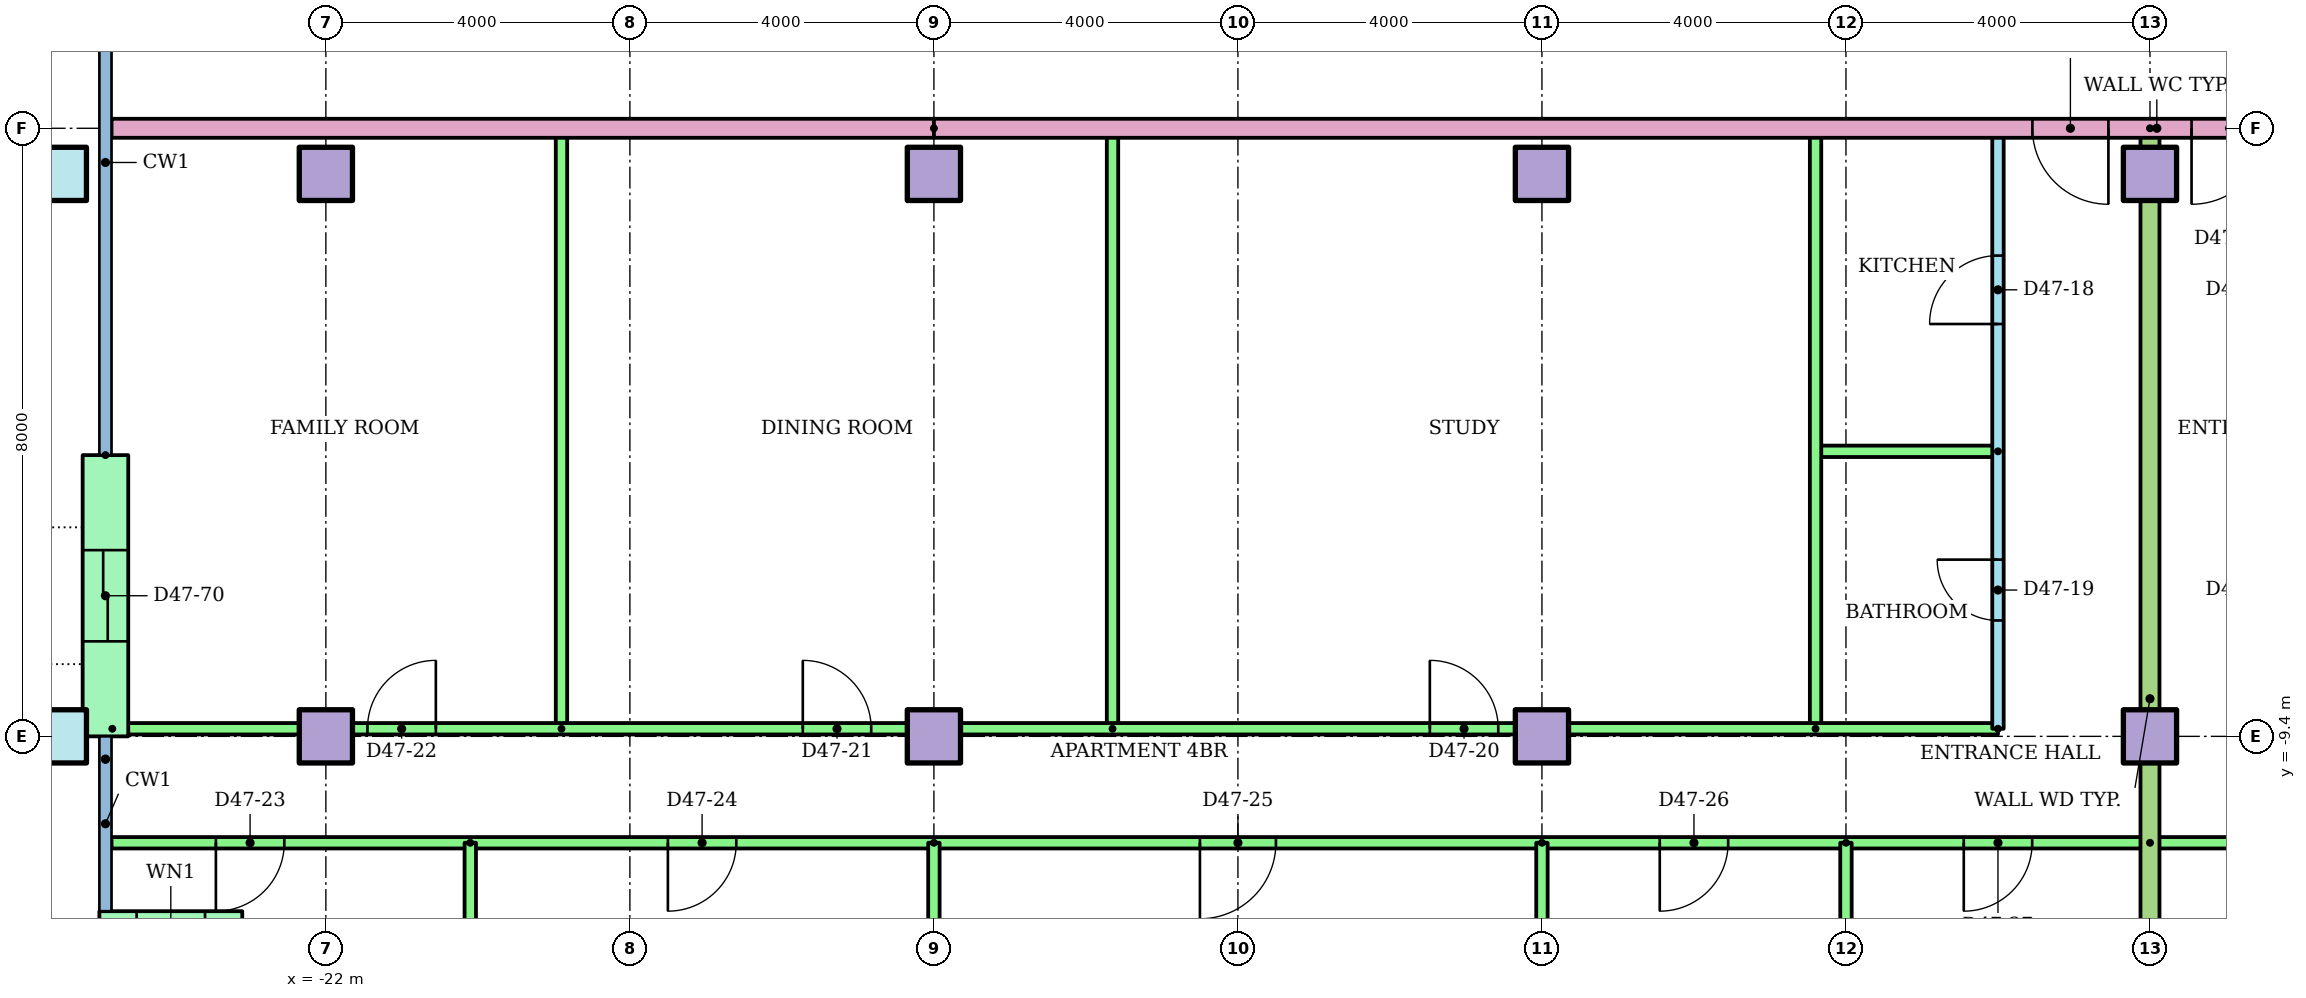
"""IFC4 building model, lengths in metres.
Left out: names, types, materials, properties, quantities, classifications, styles, units other than length and angle.
Written with IfcOpenShell. Run it as: python <this file> out.ifc"""

import sys

from ifc_helpers import new_model, si_unit, direction, frame, frame_2d, origin, origin_2d, place, context, subcontext, project, spatial, rectangle, hollow_rectangle, extrude, element, fill, save


model = new_model("IFC4")
c1 = context("Model", 3, precision=1e-05, world=origin(), true_north=direction((0.0, 1.0)))
c2 = subcontext(c1, "Body", "Model", "MODEL_VIEW")
j1 = project(units=[si_unit("LENGTHUNIT", "METRE"), si_unit("PLANEANGLEUNIT", "RADIAN")], contexts=[c1])
p1 = place(None, origin())
s1 = spatial("IfcSite", under=j1, at=p1, CompositionType="ELEMENT")
p2 = place(p1, origin())
s2 = spatial("IfcBuilding", under=s1, at=p2, CompositionType="ELEMENT")
p3 = place(p2, frame((0.0, 0.0, 181.3)))
s3 = spatial("IfcBuildingStorey", under=s2, at=p3, CompositionType="ELEMENT", Elevation=181.3)
p4 = place(p3, frame((-25.5, -9.4, 0.0)))
e1 = element("IfcColumn", 1, at=p4, inside=s3, PredefinedType="COLUMN", context=c2, shape_type="SweptSolid", body=[
    extrude(hollow_rectangle(XDim=0.7, YDim=0.7, WallThickness=0.036, at=origin_2d()), origin(), (0.0, 0.0, 1.0), 3.2),
])
for number, where in (
    (2, (-22.0, -9.4, 0.0)),
    (3, (-14.0, -9.4, 0.0)),
    (4, (-6.0, -9.4, 0.0)),
    (5, (2.0, -9.4, 0.0)),
):
    element("IfcColumn", number, at=place(p3, frame(where)), inside=s3, PredefinedType="COLUMN", context=c2, shape_type="SweptSolid", body=[
        extrude(rectangle(XDim=0.7, YDim=0.7, at=origin_2d()), origin(), (0.0, 0.0, 1.0), 3.2),
    ])
p5 = place(p3, frame((-25.5, -2.0, 0.0)))
e6 = element("IfcColumn", 6, at=p5, inside=s3, PredefinedType="COLUMN", context=c2, shape_type="SweptSolid", body=[
    extrude(hollow_rectangle(XDim=0.7, YDim=0.7, WallThickness=0.036, at=origin_2d()), origin(), (0.0, 0.0, 1.0), 3.2),
])
for number, where in (
    (7, (-22.0, -2.0, 0.0)),
    (8, (-14.0, -2.0, 0.0)),
    (9, (-6.0, -2.0, 0.0)),
    (10, (2.0, -2.0, 0.0)),
):
    element("IfcColumn", number, at=place(p3, frame(where)), inside=s3, PredefinedType="COLUMN", context=c2, shape_type="SweptSolid", body=[
        extrude(rectangle(XDim=0.7, YDim=0.7, at=origin_2d()), origin(), (0.0, 0.0, 1.0), 3.2),
    ])
p6 = place(p3, frame((-24.9, -5.7, 0.0), z_axis=(0.0, 0.0, 1.0), x_axis=(0.0, -1.0, 0.0)))
e11 = element("IfcWall", 11, at=p6, inside=s3, PredefinedType="STANDARD", context=c2, shape_type="SweptSolid", body=[
    extrude(rectangle(XDim=3.7, YDim=0.6, at=frame_2d((1.85, 0.0))), origin(), (0.0, 0.0, 1.0), 2.92),
])
p7 = place(p6, frame((1.25, 0.0, 0.0)))
e12 = element("IfcOpeningElement", 12, at=p7, cuts=e11, PredefinedType="OPENING", context=c2, shape_type="SweptSolid", body=[
    extrude(rectangle(XDim=1.2, YDim=2.1, at=frame_2d((0.6, 1.05))), frame((0.0, 0.31, 0.0), z_axis=(0.0, -1.0, 0.0), x_axis=(1.0, 0.0, 0.0)), (0.0, 0.0, 1.0), 0.62),
])
p8 = place(p3, frame((-24.98, -12.0, 0.0)))
e13 = element("IfcWall", 13, at=p8, inside=s3, PredefinedType="STANDARD", context=c2, shape_type="SweptSolid", body=[
    extrude(rectangle(XDim=1.88, YDim=0.6, at=frame_2d((0.94, 0.0))), origin(), (0.0, 0.0, 1.0), 2.92),
])
p9 = place(p8, frame((0.49, 0.0, 0.9)))
e14 = element("IfcOpeningElement", 14, at=p9, cuts=e13, PredefinedType="OPENING", context=c2, shape_type="SweptSolid", body=[
    extrude(rectangle(XDim=0.9, YDim=1.5, at=frame_2d((0.45, 0.75))), frame((0.0, 0.31, 0.0), z_axis=(0.0, -1.0, 0.0), x_axis=(1.0, 0.0, 0.0)), (0.0, 0.0, 1.0), 0.62),
])
p10 = place(p3, frame((0.0, -9.3, 0.0), z_axis=(0.0, 0.0, 1.0), x_axis=(0.0, 1.0, 0.0)))
e15 = element("IfcWall", 15, at=p10, inside=s3, PredefinedType="PARTITIONING", context=c2, shape_type="SweptSolid", body=[
    extrude(rectangle(XDim=7.9, YDim=0.15, at=frame_2d((3.95, 0.0))), origin(), (0.0, 0.0, 1.0), 2.4),
])
p11 = place(p10, frame((5.325, 0.0, 0.0)))
e16 = element("IfcOpeningElement", 16, at=p11, cuts=e15, PredefinedType="OPENING", context=c2, shape_type="SweptSolid", body=[
    extrude(rectangle(XDim=0.9, YDim=2.1, at=frame_2d((0.45, 1.05))), frame((0.0, 0.085, 0.0), z_axis=(0.0, -1.0, 0.0), x_axis=(1.0, 0.0, 0.0)), (0.0, 0.0, 1.0), 0.17),
])
p12 = place(p10, frame((1.425, 0.0, 0.0)))
e17 = element("IfcOpeningElement", 17, at=p12, cuts=e15, PredefinedType="OPENING", context=c2, shape_type="SweptSolid", body=[
    extrude(rectangle(XDim=0.8, YDim=2.1, at=frame_2d((0.4, 1.05))), frame((0.0, 0.085, 0.0), z_axis=(0.0, -1.0, 0.0), x_axis=(1.0, 0.0, 0.0)), (0.0, 0.0, 1.0), 0.17),
])
p13 = place(p3, frame((0.0, -5.65, 0.0), z_axis=(0.0, 0.0, 1.0), x_axis=(-1.0, 0.0, 0.0)))
e18 = element("IfcWall", 18, at=p13, inside=s3, PredefinedType="PARTITIONING", context=c2, shape_type="SweptSolid", body=[
    extrude(rectangle(XDim=2.4, YDim=0.15, at=frame_2d((1.2, 0.0))), origin(), (0.0, 0.0, 1.0), 2.4),
])
for number, where, z_axis, x_axis in (
    (19, (-2.4, -9.3, 0.0), (0.0, 0.0, 1.0), (0.0, 1.0, 0.0)),
    (20, (-11.65, -9.3, 0.0), (0.0, 0.0, 1.0), (0.0, 1.0, 0.0)),
    (21, (-18.9, -9.3, 0.0), (0.0, 0.0, 1.0), (0.0, 1.0, 0.0)),
):
    element("IfcWall", number, at=place(p3, frame(where, z_axis=z_axis, x_axis=x_axis)), inside=s3, PredefinedType="PARTITIONING", context=c2, shape_type="SweptSolid", body=[
        extrude(rectangle(XDim=7.9, YDim=0.15, at=frame_2d((3.95, 0.0))), origin(), (0.0, 0.0, 1.0), 2.4),
    ])
p14 = place(p3, frame((-24.81, -9.3, 0.0)))
e22 = element("IfcWall", 22, at=p14, inside=s3, PredefinedType="PARTITIONING", context=c2, shape_type="SweptSolid", body=[
    extrude(rectangle(XDim=24.81, YDim=0.15, at=frame_2d((12.405, 0.0))), origin(), (0.0, 0.0, 1.0), 2.4),
])
p15 = place(p14, frame((17.335, 0.0, 0.0)))
e23 = element("IfcOpeningElement", 23, at=p15, cuts=e22, PredefinedType="OPENING", context=c2, shape_type="SweptSolid", body=[
    extrude(rectangle(XDim=0.9, YDim=2.1, at=frame_2d((0.45, 1.05))), frame((0.0, 0.085, 0.0), z_axis=(0.0, -1.0, 0.0), x_axis=(1.0, 0.0, 0.0)), (0.0, 0.0, 1.0), 0.17),
])
p16 = place(p14, frame((9.085, 0.0, 0.0)))
e24 = element("IfcOpeningElement", 24, at=p16, cuts=e22, PredefinedType="OPENING", context=c2, shape_type="SweptSolid", body=[
    extrude(rectangle(XDim=0.9, YDim=2.1, at=frame_2d((0.45, 1.05))), frame((0.0, 0.085, 0.0), z_axis=(0.0, -1.0, 0.0), x_axis=(1.0, 0.0, 0.0)), (0.0, 0.0, 1.0), 0.17),
])
p17 = place(p14, frame((3.357, 0.0, 0.0)))
e25 = element("IfcOpeningElement", 25, at=p17, cuts=e22, PredefinedType="OPENING", context=c2, shape_type="SweptSolid", body=[
    extrude(rectangle(XDim=0.9, YDim=2.1, at=frame_2d((0.45, 1.05))), frame((0.0, 0.085, 0.0), z_axis=(0.0, -1.0, 0.0), x_axis=(1.0, 0.0, 0.0)), (0.0, 0.0, 1.0), 0.17),
])
p18 = place(p3, frame((2.0, -10.8, 0.0), z_axis=(0.0, 0.0, 1.0), x_axis=(-1.0, 0.0, 0.0)))
e26 = element("IfcWall", 26, at=p18, inside=s3, PredefinedType="PARTITIONING", context=c2, shape_type="SweptSolid", body=[
    extrude(rectangle(XDim=26.82, YDim=0.15, at=frame_2d((13.41, 0.0))), origin(), (0.0, 0.0, 1.0), 2.4),
])
p19 = place(p18, frame((24.547, 0.0, 0.0)))
e27 = element("IfcOpeningElement", 27, at=p19, cuts=e26, PredefinedType="OPENING", context=c2, shape_type="SweptSolid", body=[
    extrude(rectangle(XDim=0.9, YDim=2.1, at=frame_2d((0.45, 1.05))), frame((0.0, 0.085, 0.0), z_axis=(0.0, -1.0, 0.0), x_axis=(1.0, 0.0, 0.0)), (0.0, 0.0, 1.0), 0.17),
])
p20 = place(p18, frame((18.6, 0.0, 0.0)))
e28 = element("IfcOpeningElement", 28, at=p20, cuts=e26, PredefinedType="OPENING", context=c2, shape_type="SweptSolid", body=[
    extrude(rectangle(XDim=0.9, YDim=2.1, at=frame_2d((0.45, 1.05))), frame((0.0, 0.085, 0.0), z_axis=(0.0, -1.0, 0.0), x_axis=(1.0, 0.0, 0.0)), (0.0, 0.0, 1.0), 0.17),
])
p21 = place(p18, frame((11.5, 0.0, 0.0)))
e29 = element("IfcOpeningElement", 29, at=p21, cuts=e26, PredefinedType="OPENING", context=c2, shape_type="SweptSolid", body=[
    extrude(rectangle(XDim=1.0, YDim=2.1, at=frame_2d((0.5, 1.05))), frame((0.0, 0.085, 0.0), z_axis=(0.0, -1.0, 0.0), x_axis=(1.0, 0.0, 0.0)), (0.0, 0.0, 1.0), 0.17),
])
p22 = place(p18, frame((5.55, 0.0, 0.0)))
e30 = element("IfcOpeningElement", 30, at=p22, cuts=e26, PredefinedType="OPENING", context=c2, shape_type="SweptSolid", body=[
    extrude(rectangle(XDim=0.9, YDim=2.1, at=frame_2d((0.45, 1.05))), frame((0.0, 0.085, 0.0), z_axis=(0.0, -1.0, 0.0), x_axis=(1.0, 0.0, 0.0)), (0.0, 0.0, 1.0), 0.17),
])
p23 = place(p18, frame((1.55, 0.0, 0.0)))
e31 = element("IfcOpeningElement", 31, at=p23, cuts=e26, PredefinedType="OPENING", context=c2, shape_type="SweptSolid", body=[
    extrude(rectangle(XDim=0.9, YDim=2.1, at=frame_2d((0.45, 1.05))), frame((0.0, 0.085, 0.0), z_axis=(0.0, -1.0, 0.0), x_axis=(1.0, 0.0, 0.0)), (0.0, 0.0, 1.0), 0.17),
])
p24 = place(p3, frame((-20.1, -10.8, 0.0), z_axis=(0.0, 0.0, 1.0), x_axis=(0.0, -1.0, 0.0)))
e32 = element("IfcWall", 32, at=p24, inside=s3, PredefinedType="PARTITIONING", context=c2, shape_type="SweptSolid", body=[
    extrude(rectangle(XDim=3.82, YDim=0.15, at=frame_2d((1.91, 0.0))), origin(), (0.0, 0.0, 1.0), 2.4),
])
for number, where, z_axis, x_axis in (
    (33, (-14.0, -10.8, 0.0), (0.0, 0.0, 1.0), (0.0, -1.0, 0.0)),
    (34, (-6.0, -10.8, 0.0), (0.0, 0.0, 1.0), (0.0, -1.0, 0.0)),
):
    element("IfcWall", number, at=place(p3, frame(where, z_axis=z_axis, x_axis=x_axis)), inside=s3, PredefinedType="PARTITIONING", context=c2, shape_type="SweptSolid", body=[
        extrude(rectangle(XDim=5.61, YDim=0.15, at=frame_2d((2.805, 0.0))), origin(), (0.0, 0.0, 1.0), 2.4),
    ])
p25 = place(p3, frame((-2.0, -10.8, 0.0), z_axis=(0.0, 0.0, 1.0), x_axis=(0.0, -1.0, 0.0)))
e35 = element("IfcWall", 35, at=p25, inside=s3, PredefinedType="PARTITIONING", context=c2, shape_type="SweptSolid", body=[
    extrude(rectangle(XDim=5.621, YDim=0.15, at=frame_2d((2.811, 0.0))), origin(), (0.0, 0.0, 1.0), 2.4),
])
p26 = place(p3, frame((18.0, -10.8, 0.0), z_axis=(0.0, 0.0, 1.0), x_axis=(-1.0, 0.0, 0.0)))
e36 = element("IfcWall", 36, at=p26, inside=s3, PredefinedType="PARTITIONING", context=c2, shape_type="SweptSolid", body=[
    extrude(rectangle(XDim=16.0, YDim=0.15, at=frame_2d((8.0, 0.0))), origin(), (0.0, 0.0, 1.0), 2.4),
])
p27 = place(p26, frame((13.55, 0.0, 0.0)))
e37 = element("IfcOpeningElement", 37, at=p27, cuts=e36, PredefinedType="OPENING", context=c2, shape_type="SweptSolid", body=[
    extrude(rectangle(XDim=0.9, YDim=2.1, at=frame_2d((0.45, 1.05))), frame((0.0, 0.085, 0.0), z_axis=(0.0, -1.0, 0.0), x_axis=(1.0, 0.0, 0.0)), (0.0, 0.0, 1.0), 0.17),
])
p28 = place(p26, frame((9.5, 0.0, 0.0)))
e38 = element("IfcOpeningElement", 38, at=p28, cuts=e36, PredefinedType="OPENING", context=c2, shape_type="SweptSolid", body=[
    extrude(rectangle(XDim=1.0, YDim=2.1, at=frame_2d((0.5, 1.05))), frame((0.0, 0.085, 0.0), z_axis=(0.0, -1.0, 0.0), x_axis=(1.0, 0.0, 0.0)), (0.0, 0.0, 1.0), 0.17),
])
p29 = place(p26, frame((5.55, 0.0, 0.0)))
e39 = element("IfcOpeningElement", 39, at=p29, cuts=e36, PredefinedType="OPENING", context=c2, shape_type="SweptSolid", body=[
    extrude(rectangle(XDim=0.9, YDim=2.1, at=frame_2d((0.45, 1.05))), frame((0.0, 0.085, 0.0), z_axis=(0.0, -1.0, 0.0), x_axis=(1.0, 0.0, 0.0)), (0.0, 0.0, 1.0), 0.17),
])
p30 = place(p26, frame((1.55, 0.0, 0.0)))
e40 = element("IfcOpeningElement", 40, at=p30, cuts=e36, PredefinedType="OPENING", context=c2, shape_type="SweptSolid", body=[
    extrude(rectangle(XDim=0.9, YDim=2.1, at=frame_2d((0.45, 1.05))), frame((0.0, 0.085, 0.0), z_axis=(0.0, -1.0, 0.0), x_axis=(1.0, 0.0, 0.0)), (0.0, 0.0, 1.0), 0.17),
])
p31 = place(p3, frame((2.0, -1.4, 0.0), z_axis=(0.0, 0.0, 1.0), x_axis=(0.0, -1.0, 0.0)))
e41 = element("IfcWall", 41, at=p31, inside=s3, PredefinedType="PARTITIONING", context=c2, shape_type="SweptSolid", body=[
    extrude(rectangle(XDim=15.01, YDim=0.25, at=frame_2d((7.505, 0.0))), origin(), (0.0, 0.0, 1.0), 2.4),
])
p32 = place(p3, frame((-14.0, -1.4, 0.0), z_axis=(0.0, 0.0, 1.0), x_axis=(-1.0, 0.0, 0.0)))
e42 = element("IfcWall", 42, at=p32, inside=s3, PredefinedType="PARTITIONING", context=c2, shape_type="SweptSolid", body=[
    extrude(rectangle(XDim=10.82, YDim=0.25, at=frame_2d((5.41, 0.0))), origin(), (0.0, 0.0, 1.0), 2.4),
])
p33 = place(p3, frame((14.0, -1.4, 0.0), z_axis=(0.0, 0.0, 1.0), x_axis=(-1.0, 0.0, 0.0)))
e43 = element("IfcWall", 43, at=p33, inside=s3, PredefinedType="PARTITIONING", context=c2, shape_type="SweptSolid", body=[
    extrude(rectangle(XDim=28.0, YDim=0.25, at=frame_2d((14.0, 0.0))), origin(), (0.0, 0.0, 1.0), 2.4),
])
p34 = place(p33, frame((12.547, 0.0, 0.0)))
e44 = element("IfcOpeningElement", 44, at=p34, cuts=e43, PredefinedType="OPENING", context=c2, shape_type="SweptSolid", body=[
    extrude(rectangle(XDim=1.0, YDim=2.1, at=frame_2d((0.5, 1.05))), frame((0.0, 0.135, 0.0), z_axis=(0.0, -1.0, 0.0), x_axis=(1.0, 0.0, 0.0)), (0.0, 0.0, 1.0), 0.27),
])
p35 = place(p33, frame((10.453, 0.0, 0.0)))
e45 = element("IfcOpeningElement", 45, at=p35, cuts=e43, PredefinedType="OPENING", context=c2, shape_type="SweptSolid", body=[
    extrude(rectangle(XDim=1.0, YDim=2.1, at=frame_2d((0.5, 1.05))), frame((0.0, 0.135, 0.0), z_axis=(0.0, -1.0, 0.0), x_axis=(1.0, 0.0, 0.0)), (0.0, 0.0, 1.0), 0.27),
])
p36 = place(p11, origin())
e46 = element("IfcDoor", 46, at=p36, inside=s3, OperationType="SINGLE_SWING_LEFT", PredefinedType="DOOR", context=c2, shape_type="SweptSolid", body=[
    extrude(rectangle(XDim=0.9, YDim=2.1, at=frame_2d((0.45, 1.05))), frame((0.0, 0.025, 0.0), z_axis=(0.0, -1.0, 0.0), x_axis=(1.0, 0.0, 0.0)), (0.0, 0.0, 1.0), 0.05),
])
fill(e16, e46)
p37 = place(p12, origin())
e47 = element("IfcDoor", 47, at=p37, inside=s3, OperationType="SINGLE_SWING_RIGHT", PredefinedType="DOOR", context=c2, shape_type="SweptSolid", body=[
    extrude(rectangle(XDim=0.8, YDim=2.1, at=frame_2d((0.4, 1.05))), frame((0.0, 0.025, 0.0), z_axis=(0.0, -1.0, 0.0), x_axis=(1.0, 0.0, 0.0)), (0.0, 0.0, 1.0), 0.05),
])
fill(e17, e47)
p38 = place(p15, origin())
e48 = element("IfcDoor", 48, at=p38, inside=s3, OperationType="SINGLE_SWING_LEFT", PredefinedType="DOOR", context=c2, shape_type="SweptSolid", body=[
    extrude(rectangle(XDim=0.9, YDim=2.1, at=frame_2d((0.45, 1.05))), frame((0.0, 0.025, 0.0), z_axis=(0.0, -1.0, 0.0), x_axis=(1.0, 0.0, 0.0)), (0.0, 0.0, 1.0), 0.05),
])
fill(e23, e48)
p39 = place(p16, origin())
e49 = element("IfcDoor", 49, at=p39, inside=s3, OperationType="SINGLE_SWING_LEFT", PredefinedType="DOOR", context=c2, shape_type="SweptSolid", body=[
    extrude(rectangle(XDim=0.9, YDim=2.1, at=frame_2d((0.45, 1.05))), frame((0.0, 0.025, 0.0), z_axis=(0.0, -1.0, 0.0), x_axis=(1.0, 0.0, 0.0)), (0.0, 0.0, 1.0), 0.05),
])
fill(e24, e49)
p40 = place(p17, origin())
e50 = element("IfcDoor", 50, at=p40, inside=s3, OperationType="SINGLE_SWING_RIGHT", PredefinedType="DOOR", context=c2, shape_type="SweptSolid", body=[
    extrude(rectangle(XDim=0.9, YDim=2.1, at=frame_2d((0.45, 1.05))), frame((0.0, 0.025, 0.0), z_axis=(0.0, -1.0, 0.0), x_axis=(1.0, 0.0, 0.0)), (0.0, 0.0, 1.0), 0.05),
])
fill(e25, e50)
p41 = place(p19, origin())
e51 = element("IfcDoor", 51, at=p41, inside=s3, OperationType="SINGLE_SWING_RIGHT", PredefinedType="DOOR", context=c2, shape_type="SweptSolid", body=[
    extrude(rectangle(XDim=0.9, YDim=2.1, at=frame_2d((0.45, 1.05))), frame((0.0, 0.025, 0.0), z_axis=(0.0, -1.0, 0.0), x_axis=(1.0, 0.0, 0.0)), (0.0, 0.0, 1.0), 0.05),
])
fill(e27, e51)
p42 = place(p20, origin())
e52 = element("IfcDoor", 52, at=p42, inside=s3, OperationType="SINGLE_SWING_RIGHT", PredefinedType="DOOR", context=c2, shape_type="SweptSolid", body=[
    extrude(rectangle(XDim=0.9, YDim=2.1, at=frame_2d((0.45, 1.05))), frame((0.0, 0.025, 0.0), z_axis=(0.0, -1.0, 0.0), x_axis=(1.0, 0.0, 0.0)), (0.0, 0.0, 1.0), 0.05),
])
fill(e28, e52)
p43 = place(p21, origin())
e53 = element("IfcDoor", 53, at=p43, inside=s3, OperationType="SINGLE_SWING_RIGHT", PredefinedType="DOOR", context=c2, shape_type="SweptSolid", body=[
    extrude(rectangle(XDim=1.0, YDim=2.1, at=frame_2d((0.5, 1.05))), frame((0.0, 0.025, 0.0), z_axis=(0.0, -1.0, 0.0), x_axis=(1.0, 0.0, 0.0)), (0.0, 0.0, 1.0), 0.05),
])
fill(e29, e53)
p44 = place(p22, origin())
e54 = element("IfcDoor", 54, at=p44, inside=s3, OperationType="SINGLE_SWING_RIGHT", PredefinedType="DOOR", context=c2, shape_type="SweptSolid", body=[
    extrude(rectangle(XDim=0.9, YDim=2.1, at=frame_2d((0.45, 1.05))), frame((0.0, 0.025, 0.0), z_axis=(0.0, -1.0, 0.0), x_axis=(1.0, 0.0, 0.0)), (0.0, 0.0, 1.0), 0.05),
])
fill(e30, e54)
p45 = place(p23, origin())
e55 = element("IfcDoor", 55, at=p45, inside=s3, OperationType="SINGLE_SWING_RIGHT", PredefinedType="DOOR", context=c2, shape_type="SweptSolid", body=[
    extrude(rectangle(XDim=0.9, YDim=2.1, at=frame_2d((0.45, 1.05))), frame((0.0, 0.025, 0.0), z_axis=(0.0, -1.0, 0.0), x_axis=(1.0, 0.0, 0.0)), (0.0, 0.0, 1.0), 0.05),
])
fill(e31, e55)
p46 = place(p34, origin())
e56 = element("IfcDoor", 56, at=p46, inside=s3, OperationType="SINGLE_SWING_LEFT", PredefinedType="DOOR", context=c2, shape_type="SweptSolid", body=[
    extrude(rectangle(XDim=1.0, YDim=2.1, at=frame_2d((0.5, 1.05))), frame((0.0, 0.025, 0.0), z_axis=(0.0, -1.0, 0.0), x_axis=(1.0, 0.0, 0.0)), (0.0, 0.0, 1.0), 0.05),
])
fill(e44, e56)
p47 = place(p35, origin())
e57 = element("IfcDoor", 57, at=p47, inside=s3, OperationType="SINGLE_SWING_RIGHT", PredefinedType="DOOR", context=c2, shape_type="SweptSolid", body=[
    extrude(rectangle(XDim=1.0, YDim=2.1, at=frame_2d((0.5, 1.05))), frame((0.0, 0.025, 0.0), z_axis=(0.0, -1.0, 0.0), x_axis=(1.0, 0.0, 0.0)), (0.0, 0.0, 1.0), 0.05),
])
fill(e45, e57)
p48 = place(p7, origin())
e58 = element("IfcDoor", 58, at=p48, inside=s3, OperationType="SLIDING_TO_LEFT", PredefinedType="DOOR", context=c2, shape_type="SweptSolid", body=[
    extrude(rectangle(XDim=1.2, YDim=2.1, at=frame_2d((0.6, 1.05))), frame((0.0, 0.025, 0.0), z_axis=(0.0, -1.0, 0.0), x_axis=(1.0, 0.0, 0.0)), (0.0, 0.0, 1.0), 0.05),
])
fill(e12, e58)
save(model, sys.argv[1])
